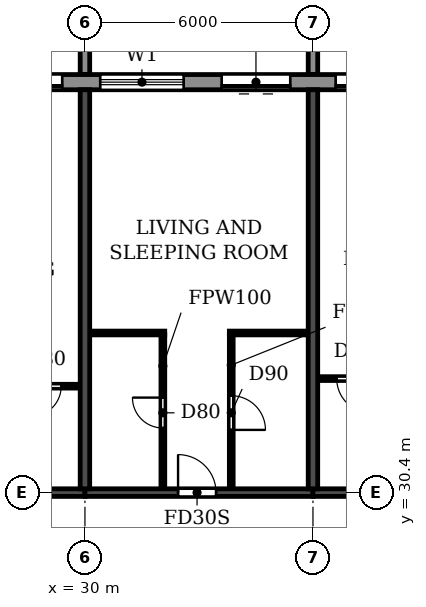
"""IFC4 building model, lengths in metres.
Left out: names, types, materials, properties, quantities, classifications, styles, units other than length and angle.
Written with IfcOpenShell. Run it as: python <this file> out.ifc"""

import sys

from ifc_helpers import new_model, si_unit, direction, frame, frame_2d, origin, place, context, subcontext, project, spatial, polyline, rectangle, outline, extrude, source, transform, mapped, element, fill, save


model = new_model("IFC4")
c1 = context("Model", 3, precision=1e-05, world=origin(), true_north=direction((0.0, 1.0)))
c2 = subcontext(c1, "Body", "Model", "MODEL_VIEW")
j1 = project(units=[si_unit("LENGTHUNIT", "METRE"), si_unit("PLANEANGLEUNIT", "RADIAN")], contexts=[c1])
p1 = place(None, origin())
s1 = spatial("IfcSite", under=j1, at=p1, CompositionType="ELEMENT")
p2 = place(p1, origin())
s2 = spatial("IfcBuilding", under=s1, at=p2, CompositionType="ELEMENT")
p3 = place(p2, frame((0.0, 0.0, 201.6)))
s3 = spatial("IfcBuildingStorey", under=s2, at=p3, CompositionType="ELEMENT", Elevation=201.6)
for number, where, z_axis, x_axis in (
    (1, (30.0, 30.5, 0.0), (0.0, 0.0, 1.0), (0.0, 1.0, 0.0)),
    (2, (36.0, 30.5, 0.0), (0.0, 0.0, 1.0), (0.0, 1.0, 0.0)),
):
    element("IfcWall", number, at=place(p3, frame(where, z_axis=z_axis, x_axis=x_axis)), inside=s3, PredefinedType="SHEAR", context=c2, shape_type="SweptSolid", body=[
        extrude(rectangle(XDim=10.5, YDim=0.25, at=frame_2d((5.25, 0.0))), origin(), (0.0, 0.0, 1.0), 3.08),
    ])
p4 = place(p3, frame((24.0, 30.4, 0.0), z_axis=(0.0, 0.0, 1.0), x_axis=(1.0, 0.0, 0.0)))
e3 = element("IfcWall", 3, at=p4, inside=s3, PredefinedType="SHEAR", context=c2, shape_type="SweptSolid", body=[
    extrude(rectangle(XDim=6.0, YDim=0.2, at=frame_2d((3.0, 0.0))), origin(), (0.0, 0.0, 1.0), 2.48),
])
p5 = place(p4, frame((2.55, 0.0, 0.0)))
e4 = element("IfcOpeningElement", 4, at=p5, cuts=e3, PredefinedType="OPENING", context=c2, shape_type="SweptSolid", body=[
    extrude(rectangle(XDim=1.0, YDim=2.1, at=frame_2d((0.5, 1.05))), frame((0.0, 0.11, 0.0), z_axis=(0.0, -1.0, 0.0), x_axis=(1.0, 0.0, 0.0)), (0.0, 0.0, 1.0), 0.22),
])
p6 = place(p3, frame((30.0, 30.4, 0.0), z_axis=(0.0, 0.0, 1.0), x_axis=(1.0, 0.0, 0.0)))
e5 = element("IfcWall", 5, at=p6, inside=s3, PredefinedType="SHEAR", context=c2, shape_type="SweptSolid", body=[
    extrude(rectangle(XDim=6.0, YDim=0.2, at=frame_2d((3.0, 0.0))), origin(), (0.0, 0.0, 1.0), 2.48),
])
p7 = place(p6, frame((2.45, 0.0, 0.0)))
e6 = element("IfcOpeningElement", 6, at=p7, cuts=e5, PredefinedType="OPENING", context=c2, shape_type="SweptSolid", body=[
    extrude(rectangle(XDim=1.0, YDim=2.1, at=frame_2d((0.5, 1.05))), frame((0.0, 0.11, 0.0), z_axis=(0.0, -1.0, 0.0), x_axis=(1.0, 0.0, 0.0)), (0.0, 0.0, 1.0), 0.22),
])
p8 = place(p3, frame((36.0, 30.4, 0.0), z_axis=(0.0, 0.0, 1.0), x_axis=(1.0, 0.0, 0.0)))
e7 = element("IfcWall", 7, at=p8, inside=s3, PredefinedType="SHEAR", context=c2, shape_type="SweptSolid", body=[
    extrude(rectangle(XDim=6.0, YDim=0.2, at=frame_2d((3.0, 0.0))), origin(), (0.0, 0.0, 1.0), 2.48),
])
p9 = place(p8, frame((2.55, 0.0, 0.0)))
e8 = element("IfcOpeningElement", 8, at=p9, cuts=e7, PredefinedType="OPENING", context=c2, shape_type="SweptSolid", body=[
    extrude(rectangle(XDim=1.0, YDim=2.1, at=frame_2d((0.5, 1.05))), frame((0.0, 0.11, 0.0), z_axis=(0.0, -1.0, 0.0), x_axis=(1.0, 0.0, 0.0)), (0.0, 0.0, 1.0), 0.22),
])
p10 = place(p3, frame((79.317, 41.2, 0.0), z_axis=(0.0, 0.0, 1.0), x_axis=(-1.0, 0.0, 0.0)))
e9 = element("IfcWall", 9, at=p10, inside=s3, PredefinedType="STANDARD", context=c2, shape_type="SweptSolid", body=[
    extrude(rectangle(XDim=56.634, YDim=0.4, at=frame_2d((28.317, 0.0))), origin(), (0.0, 0.0, 1.0), 3.08),
])
p11 = place(p10, frame((52.717, 0.0, 0.9)))
e10 = element("IfcOpeningElement", 10, at=p11, cuts=e9, PredefinedType="OPENING", context=c2, shape_type="SweptSolid", body=[
    extrude(rectangle(XDim=2.2, YDim=1.5, at=frame_2d((1.1, 0.75))), frame((0.0, 0.21, 0.0), z_axis=(0.0, -1.0, 0.0), x_axis=(1.0, 0.0, 0.0)), (0.0, 0.0, 1.0), 0.42),
])
p12 = place(p10, frame((49.917, 0.0, 0.0)))
e11 = element("IfcOpeningElement", 11, at=p12, cuts=e9, PredefinedType="OPENING", context=c2, shape_type="SweptSolid", body=[
    extrude(rectangle(XDim=1.8, YDim=2.4, at=frame_2d((0.9, 1.2))), frame((0.0, 0.21, 0.0), z_axis=(0.0, -1.0, 0.0), x_axis=(1.0, 0.0, 0.0)), (0.0, 0.0, 1.0), 0.42),
])
p13 = place(p10, frame((46.717, 0.0, 0.9)))
e12 = element("IfcOpeningElement", 12, at=p13, cuts=e9, PredefinedType="OPENING", context=c2, shape_type="SweptSolid", body=[
    extrude(rectangle(XDim=2.2, YDim=1.5, at=frame_2d((1.1, 0.75))), frame((0.0, 0.21, 0.0), z_axis=(0.0, -1.0, 0.0), x_axis=(1.0, 0.0, 0.0)), (0.0, 0.0, 1.0), 0.42),
])
p14 = place(p10, frame((43.917, 0.0, 0.0)))
e13 = element("IfcOpeningElement", 13, at=p14, cuts=e9, PredefinedType="OPENING", context=c2, shape_type="SweptSolid", body=[
    extrude(rectangle(XDim=1.8, YDim=2.4, at=frame_2d((0.9, 1.2))), frame((0.0, 0.21, 0.0), z_axis=(0.0, -1.0, 0.0), x_axis=(1.0, 0.0, 0.0)), (0.0, 0.0, 1.0), 0.42),
])
p15 = place(p10, frame((40.917, 0.0, 0.0)))
e14 = element("IfcOpeningElement", 14, at=p15, cuts=e9, PredefinedType="OPENING", context=c2, shape_type="SweptSolid", body=[
    extrude(rectangle(XDim=1.8, YDim=2.4, at=frame_2d((0.9, 1.2))), frame((0.0, 0.21, 0.0), z_axis=(0.0, -1.0, 0.0), x_axis=(1.0, 0.0, 0.0)), (0.0, 0.0, 1.0), 0.42),
])
p16 = place(p10, frame((37.717, 0.0, 0.9)))
e15 = element("IfcOpeningElement", 15, at=p16, cuts=e9, PredefinedType="OPENING", context=c2, shape_type="SweptSolid", body=[
    extrude(rectangle(XDim=2.2, YDim=1.5, at=frame_2d((1.1, 0.75))), frame((0.0, 0.21, 0.0), z_axis=(0.0, -1.0, 0.0), x_axis=(1.0, 0.0, 0.0)), (0.0, 0.0, 1.0), 0.42),
])
p17 = place(p10, frame((34.717, 0.0, 0.9)))
e16 = element("IfcOpeningElement", 16, at=p17, cuts=e9, PredefinedType="OPENING", context=c2, shape_type="SweptSolid", body=[
    extrude(rectangle(XDim=2.2, YDim=1.5, at=frame_2d((1.1, 0.75))), frame((0.0, 0.21, 0.0), z_axis=(0.0, -1.0, 0.0), x_axis=(1.0, 0.0, 0.0)), (0.0, 0.0, 1.0), 0.42),
])
p18 = place(p10, frame((31.717, 0.0, 0.9)))
e17 = element("IfcOpeningElement", 17, at=p18, cuts=e9, PredefinedType="OPENING", context=c2, shape_type="SweptSolid", body=[
    extrude(rectangle(XDim=2.2, YDim=1.5, at=frame_2d((1.1, 0.75))), frame((0.0, 0.21, 0.0), z_axis=(0.0, -1.0, 0.0), x_axis=(1.0, 0.0, 0.0)), (0.0, 0.0, 1.0), 0.42),
])
p19 = place(p10, frame((28.717, 0.0, 0.9)))
e18 = element("IfcOpeningElement", 18, at=p19, cuts=e9, PredefinedType="OPENING", context=c2, shape_type="SweptSolid", body=[
    extrude(rectangle(XDim=2.2, YDim=1.5, at=frame_2d((1.1, 0.75))), frame((0.0, 0.21, 0.0), z_axis=(0.0, -1.0, 0.0), x_axis=(1.0, 0.0, 0.0)), (0.0, 0.0, 1.0), 0.42),
])
p20 = place(p10, frame((25.917, 0.0, 0.0)))
e19 = element("IfcOpeningElement", 19, at=p20, cuts=e9, PredefinedType="OPENING", context=c2, shape_type="SweptSolid", body=[
    extrude(rectangle(XDim=1.8, YDim=2.4, at=frame_2d((0.9, 1.2))), frame((0.0, 0.21, 0.0), z_axis=(0.0, -1.0, 0.0), x_axis=(1.0, 0.0, 0.0)), (0.0, 0.0, 1.0), 0.42),
])
p21 = place(p10, frame((22.717, 0.0, 0.9)))
e20 = element("IfcOpeningElement", 20, at=p21, cuts=e9, PredefinedType="OPENING", context=c2, shape_type="SweptSolid", body=[
    extrude(rectangle(XDim=2.2, YDim=1.5, at=frame_2d((1.1, 0.75))), frame((0.0, 0.21, 0.0), z_axis=(0.0, -1.0, 0.0), x_axis=(1.0, 0.0, 0.0)), (0.0, 0.0, 1.0), 0.42),
])
p22 = place(p10, frame((19.717, 0.0, 0.9)))
e21 = element("IfcOpeningElement", 21, at=p22, cuts=e9, PredefinedType="OPENING", context=c2, shape_type="SweptSolid", body=[
    extrude(rectangle(XDim=2.2, YDim=1.5, at=frame_2d((1.1, 0.75))), frame((0.0, 0.21, 0.0), z_axis=(0.0, -1.0, 0.0), x_axis=(1.0, 0.0, 0.0)), (0.0, 0.0, 1.0), 0.42),
])
p23 = place(p10, frame((16.917, 0.0, 0.0)))
e22 = element("IfcOpeningElement", 22, at=p23, cuts=e9, PredefinedType="OPENING", context=c2, shape_type="SweptSolid", body=[
    extrude(rectangle(XDim=1.8, YDim=2.4, at=frame_2d((0.9, 1.2))), frame((0.0, 0.21, 0.0), z_axis=(0.0, -1.0, 0.0), x_axis=(1.0, 0.0, 0.0)), (0.0, 0.0, 1.0), 0.42),
])
p24 = place(p10, frame((13.717, 0.0, 0.9)))
e23 = element("IfcOpeningElement", 23, at=p24, cuts=e9, PredefinedType="OPENING", context=c2, shape_type="SweptSolid", body=[
    extrude(rectangle(XDim=2.2, YDim=1.5, at=frame_2d((1.1, 0.75))), frame((0.0, 0.21, 0.0), z_axis=(0.0, -1.0, 0.0), x_axis=(1.0, 0.0, 0.0)), (0.0, 0.0, 1.0), 0.42),
])
p25 = place(p10, frame((10.717, 0.0, 0.9)))
e24 = element("IfcOpeningElement", 24, at=p25, cuts=e9, PredefinedType="OPENING", context=c2, shape_type="SweptSolid", body=[
    extrude(rectangle(XDim=2.2, YDim=1.5, at=frame_2d((1.1, 0.75))), frame((0.0, 0.21, 0.0), z_axis=(0.0, -1.0, 0.0), x_axis=(1.0, 0.0, 0.0)), (0.0, 0.0, 1.0), 0.42),
])
p26 = place(p10, frame((7.717, 0.0, 0.9)))
e25 = element("IfcOpeningElement", 25, at=p26, cuts=e9, PredefinedType="OPENING", context=c2, shape_type="SweptSolid", body=[
    extrude(rectangle(XDim=2.2, YDim=1.5, at=frame_2d((1.1, 0.75))), frame((0.0, 0.21, 0.0), z_axis=(0.0, -1.0, 0.0), x_axis=(1.0, 0.0, 0.0)), (0.0, 0.0, 1.0), 0.42),
])
p27 = place(p10, frame((4.917, 0.0, 0.0)))
e26 = element("IfcOpeningElement", 26, at=p27, cuts=e9, PredefinedType="OPENING", context=c2, shape_type="SweptSolid", body=[
    extrude(rectangle(XDim=1.8, YDim=2.4, at=frame_2d((0.9, 1.2))), frame((0.0, 0.21, 0.0), z_axis=(0.0, -1.0, 0.0), x_axis=(1.0, 0.0, 0.0)), (0.0, 0.0, 1.0), 0.42),
])
p28 = place(p10, frame((1.717, 0.0, 0.9)))
e27 = element("IfcOpeningElement", 27, at=p28, cuts=e9, PredefinedType="OPENING", context=c2, shape_type="SweptSolid", body=[
    extrude(rectangle(XDim=2.2, YDim=1.5, at=frame_2d((1.1, 0.75))), frame((0.0, 0.21, 0.0), z_axis=(0.0, -1.0, 0.0), x_axis=(1.0, 0.0, 0.0)), (0.0, 0.0, 1.0), 0.42),
])
m1 = source(origin(), c2, "Body", "SweptSolid", [
    extrude(outline(polyline([(0.0, 0.0), (0.25, 0.0), (0.25, 3.1), (0.0, 3.1), (0.0, 0.0)])), origin(), (0.0, 0.0, 1.0), 3.1),
])
for number, where in (
    (28, (29.875, 41.4, 0.0)),
    (29, (35.875, 41.4, 0.0)),
):
    element("IfcWall", number, at=place(p3, frame(where)), inside=s3, PredefinedType="STANDARD", context=c2, shape_type="MappedRepresentation", body=[
        mapped(m1, transform((0.0, 0.0, 0.0))),
    ])
p29 = place(p3, frame((27.9, 33.2, 0.0), z_axis=(0.0, 0.0, 1.0), x_axis=(1.0, 0.0, 0.0)))
e30 = element("IfcWall", 30, at=p29, inside=s3, PredefinedType="PARTITIONING", context=c2, shape_type="SweptSolid", body=[
    extrude(rectangle(XDim=1.965, YDim=0.1, at=frame_2d((0.982, 0.0))), origin(), (0.0, 0.0, 1.0), 3.08),
])
p30 = place(p29, frame((0.675, 0.0, 0.0)))
e31 = element("IfcOpeningElement", 31, at=p30, cuts=e30, PredefinedType="OPENING", context=c2, shape_type="SweptSolid", body=[
    extrude(rectangle(XDim=0.8, YDim=2.1, at=frame_2d((0.4, 1.05))), frame((0.0, 0.06, 0.0), z_axis=(0.0, -1.0, 0.0), x_axis=(1.0, 0.0, 0.0)), (0.0, 0.0, 1.0), 0.12),
])
p31 = place(p3, frame((36.135, 33.4, 0.0), z_axis=(0.0, 0.0, 1.0), x_axis=(1.0, 0.0, 0.0)))
e32 = element("IfcWall", 32, at=p31, inside=s3, PredefinedType="PARTITIONING", context=c2, shape_type="SweptSolid", body=[
    extrude(rectangle(XDim=2.065, YDim=0.1, at=frame_2d((1.032, 0.0))), origin(), (0.0, 0.0, 1.0), 3.08),
])
p32 = place(p31, frame((0.49, 0.0, 0.0)))
e33 = element("IfcOpeningElement", 33, at=p32, cuts=e32, PredefinedType="OPENING", context=c2, shape_type="SweptSolid", body=[
    extrude(rectangle(XDim=0.9, YDim=2.1, at=frame_2d((0.45, 1.05))), frame((0.0, 0.06, 0.0), z_axis=(0.0, -1.0, 0.0), x_axis=(1.0, 0.0, 0.0)), (0.0, 0.0, 1.0), 0.12),
])
p33 = place(p3, frame((30.135, 34.6, 0.0), z_axis=(0.0, 0.0, 1.0), x_axis=(1.0, 0.0, 0.0)))
e34 = element("IfcWall", 34, at=p33, inside=s3, PredefinedType="PARTITIONING", context=c2, shape_type="SweptSolid", body=[
    extrude(rectangle(XDim=1.965, YDim=0.1, at=frame_2d((0.982, 0.0))), origin(), (0.0, 0.0, 1.0), 3.08),
])
p34 = place(p3, frame((33.8, 34.6, 0.0), z_axis=(0.0, 0.0, 1.0), x_axis=(1.0, 0.0, 0.0)))
e35 = element("IfcWall", 35, at=p34, inside=s3, PredefinedType="PARTITIONING", context=c2, shape_type="SweptSolid", body=[
    extrude(rectangle(XDim=2.065, YDim=0.1, at=frame_2d((1.032, 0.0))), origin(), (0.0, 0.0, 1.0), 3.08),
])
p35 = place(p3, frame((32.05, 30.51, 0.0), z_axis=(0.0, 0.0, 1.0), x_axis=(0.0, 1.0, 0.0)))
e36 = element("IfcWall", 36, at=p35, inside=s3, PredefinedType="PARTITIONING", context=c2, shape_type="SweptSolid", body=[
    extrude(rectangle(XDim=4.04, YDim=0.1, at=frame_2d((2.02, 0.0))), origin(), (0.0, 0.0, 1.0), 3.08),
])
p36 = place(p35, frame((1.59, 0.0, 0.0)))
e37 = element("IfcOpeningElement", 37, at=p36, cuts=e36, PredefinedType="OPENING", context=c2, shape_type="SweptSolid", body=[
    extrude(rectangle(XDim=0.8, YDim=2.1, at=frame_2d((0.4, 1.05))), frame((0.0, 0.06, 0.0), z_axis=(0.0, -1.0, 0.0), x_axis=(1.0, 0.0, 0.0)), (0.0, 0.0, 1.0), 0.12),
])
p37 = place(p3, frame((33.85, 30.51, 0.0), z_axis=(0.0, 0.0, 1.0), x_axis=(0.0, 1.0, 0.0)))
e38 = element("IfcWall", 38, at=p37, inside=s3, PredefinedType="PARTITIONING", context=c2, shape_type="SweptSolid", body=[
    extrude(rectangle(XDim=4.04, YDim=0.1, at=frame_2d((2.02, 0.0))), origin(), (0.0, 0.0, 1.0), 3.08),
])
p38 = place(p37, frame((1.54, 0.0, 0.0)))
e39 = element("IfcOpeningElement", 39, at=p38, cuts=e38, PredefinedType="OPENING", context=c2, shape_type="SweptSolid", body=[
    extrude(rectangle(XDim=0.9, YDim=2.1, at=frame_2d((0.45, 1.05))), frame((0.0, 0.06, 0.0), z_axis=(0.0, -1.0, 0.0), x_axis=(1.0, 0.0, 0.0)), (0.0, 0.0, 1.0), 0.12),
])
p39 = place(p12, origin())
e40 = element("IfcDoor", 40, at=p39, inside=s3, OperationType="DOUBLE_DOOR_SLIDING", PredefinedType="DOOR", context=c2, shape_type="SweptSolid", body=[
    extrude(rectangle(XDim=1.8, YDim=2.4, at=frame_2d((0.9, 1.2))), frame((0.0, 0.025, 0.0), z_axis=(0.0, -1.0, 0.0), x_axis=(1.0, 0.0, 0.0)), (0.0, 0.0, 1.0), 0.05),
])
fill(e11, e40)
p40 = place(p13, origin())
e41 = element("IfcWindow", 41, at=p40, inside=s3, PartitioningType="DOUBLE_PANEL_HORIZONTAL", PredefinedType="WINDOW", context=c2, shape_type="SweptSolid", body=[
    extrude(rectangle(XDim=2.2, YDim=1.5, at=frame_2d((1.1, 0.75))), frame((0.0, 0.03, 0.0), z_axis=(0.0, -1.0, 0.0), x_axis=(1.0, 0.0, 0.0)), (0.0, 0.0, 1.0), 0.06),
])
fill(e12, e41)
p41 = place(p14, origin())
e42 = element("IfcDoor", 42, at=p41, inside=s3, OperationType="DOUBLE_DOOR_SLIDING", PredefinedType="DOOR", context=c2, shape_type="SweptSolid", body=[
    extrude(rectangle(XDim=1.8, YDim=2.4, at=frame_2d((0.9, 1.2))), frame((0.0, 0.025, 0.0), z_axis=(0.0, -1.0, 0.0), x_axis=(1.0, 0.0, 0.0)), (0.0, 0.0, 1.0), 0.05),
])
fill(e13, e42)
p42 = place(p15, origin())
e43 = element("IfcDoor", 43, at=p42, inside=s3, OperationType="DOUBLE_DOOR_SLIDING", PredefinedType="DOOR", context=c2, shape_type="SweptSolid", body=[
    extrude(rectangle(XDim=1.8, YDim=2.4, at=frame_2d((0.9, 1.2))), frame((0.0, 0.025, 0.0), z_axis=(0.0, -1.0, 0.0), x_axis=(1.0, 0.0, 0.0)), (0.0, 0.0, 1.0), 0.05),
])
fill(e14, e43)
p43 = place(p30, frame((0.8, 0.0, 0.0), z_axis=(0.0, 0.0, 1.0), x_axis=(-1.0, 0.0, 0.0)))
e44 = element("IfcDoor", 44, at=p43, inside=s3, OperationType="SINGLE_SWING_RIGHT", PredefinedType="DOOR", context=c2, shape_type="SweptSolid", body=[
    extrude(rectangle(XDim=0.8, YDim=2.1, at=frame_2d((0.4, 1.05))), frame((0.0, 0.025, 0.0), z_axis=(0.0, -1.0, 0.0), x_axis=(1.0, 0.0, 0.0)), (0.0, 0.0, 1.0), 0.05),
])
fill(e31, e44)
p44 = place(p36, origin())
e45 = element("IfcDoor", 45, at=p44, inside=s3, OperationType="SINGLE_SWING_RIGHT", PredefinedType="DOOR", context=c2, shape_type="SweptSolid", body=[
    extrude(rectangle(XDim=0.8, YDim=2.1, at=frame_2d((0.4, 1.05))), frame((0.0, 0.025, 0.0), z_axis=(0.0, -1.0, 0.0), x_axis=(1.0, 0.0, 0.0)), (0.0, 0.0, 1.0), 0.05),
])
fill(e37, e45)
p45 = place(p7, origin())
e46 = element("IfcDoor", 46, at=p45, inside=s3, OperationType="SINGLE_SWING_LEFT", PredefinedType="DOOR", context=c2, shape_type="SweptSolid", body=[
    extrude(rectangle(XDim=1.0, YDim=2.1, at=frame_2d((0.5, 1.05))), frame((0.0, 0.025, 0.0), z_axis=(0.0, -1.0, 0.0), x_axis=(1.0, 0.0, 0.0)), (0.0, 0.0, 1.0), 0.05),
])
fill(e6, e46)
p46 = place(p38, frame((0.9, 0.0, 0.0), z_axis=(0.0, 0.0, 1.0), x_axis=(-1.0, 0.0, 0.0)))
e47 = element("IfcDoor", 47, at=p46, inside=s3, OperationType="SINGLE_SWING_RIGHT", PredefinedType="DOOR", context=c2, shape_type="SweptSolid", body=[
    extrude(rectangle(XDim=0.9, YDim=2.1, at=frame_2d((0.45, 1.05))), frame((0.0, 0.025, 0.0), z_axis=(0.0, -1.0, 0.0), x_axis=(1.0, 0.0, 0.0)), (0.0, 0.0, 1.0), 0.05),
])
fill(e39, e47)
p47 = place(p32, frame((0.9, 0.0, 0.0), z_axis=(0.0, 0.0, 1.0), x_axis=(-1.0, 0.0, 0.0)))
e48 = element("IfcDoor", 48, at=p47, inside=s3, OperationType="SINGLE_SWING_LEFT", PredefinedType="DOOR", context=c2, shape_type="SweptSolid", body=[
    extrude(rectangle(XDim=0.9, YDim=2.1, at=frame_2d((0.45, 1.05))), frame((0.0, 0.025, 0.0), z_axis=(0.0, -1.0, 0.0), x_axis=(1.0, 0.0, 0.0)), (0.0, 0.0, 1.0), 0.05),
])
fill(e33, e48)
save(model, sys.argv[1])
